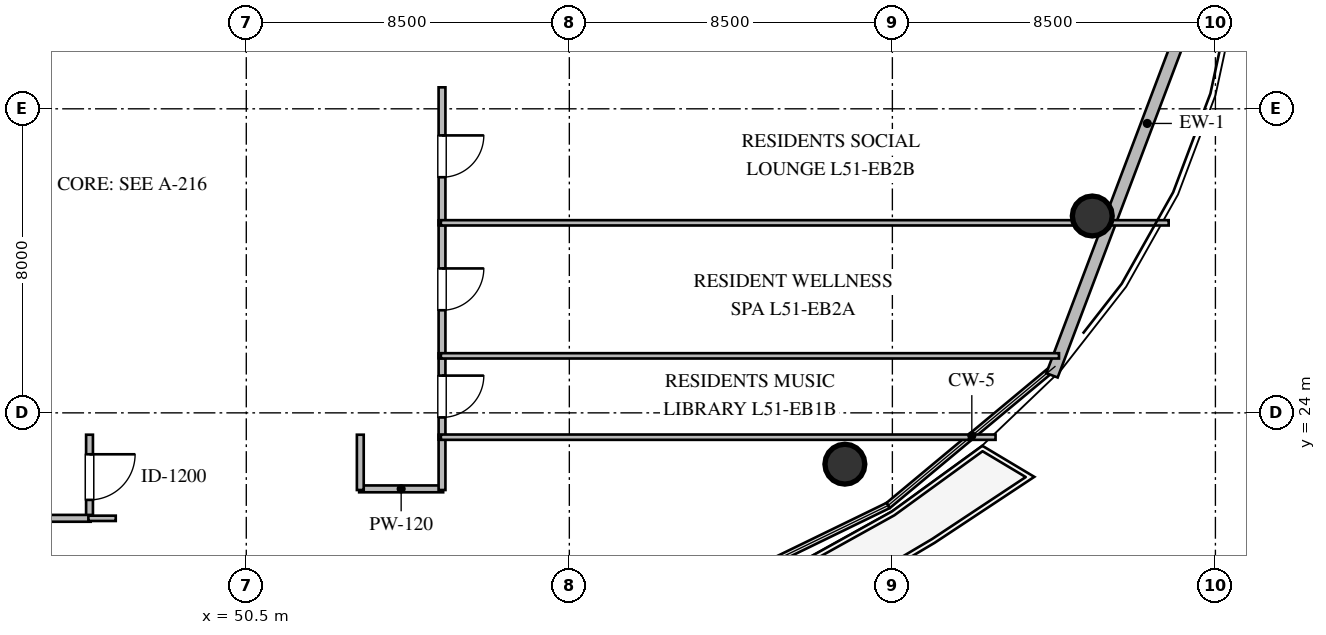
"""IFC4 building model, lengths in metres.
Left out: names, types, materials, properties, quantities, classifications, styles, units other than length and angle.
Written with IfcOpenShell. Run it as: python <this file> out.ifc"""

import sys

from ifc_helpers import new_model, si_unit, direction, frame, frame_2d, origin, origin_2d, place, context, subcontext, project, spatial, rectangle, circle, extrude, element, fill, save


model = new_model("IFC4")
c1 = context("Model", 3, precision=1e-05, world=origin(), true_north=direction((0.0, 1.0)))
c2 = subcontext(c1, "Body", "Model", "MODEL_VIEW")
j1 = project(units=[si_unit("LENGTHUNIT", "METRE"), si_unit("PLANEANGLEUNIT", "RADIAN")], contexts=[c1])
p1 = place(None, origin())
s1 = spatial("IfcSite", under=j1, at=p1, CompositionType="ELEMENT")
p2 = place(p1, origin())
s2 = spatial("IfcBuilding", under=s1, at=p2, CompositionType="ELEMENT")
p3 = place(p2, frame((0.0, 0.0, 195.6)))
s3 = spatial("IfcBuildingStorey", under=s2, at=p3, CompositionType="ELEMENT", Elevation=195.6)
for number, where, z_axis, x_axis in (
    (1, (66.25, 22.65, 0.0), (0.0, 0.0, 1.0), (1.0, 0.0, 0.0)),
    (2, (72.76, 29.18, 0.0), (0.0, 0.0, 1.0), (1.0, 0.0, 0.0)),
):
    element("IfcColumn", number, at=place(p3, frame(where, z_axis=z_axis, x_axis=x_axis)), inside=s3, PredefinedType="COLUMN", context=c2, shape_type="SweptSolid", body=[
        extrude(circle(Radius=0.525, at=origin_2d()), origin(), (0.0, 0.0, 1.0), 3.6),
    ])
p4 = place(p3, frame((76.712, 38.243, 0.0), z_axis=(0.0, 0.0, 1.0), x_axis=(-0.353659523244, -0.935374225441, 0.0)))
e3 = element("IfcWall", 3, at=p4, inside=s3, PredefinedType="STANDARD", context=c2, shape_type="SweptSolid", body=[
    extrude(rectangle(XDim=14.172, YDim=0.32, at=frame_2d((7.086, 0.0))), origin(), (0.0, 0.0, 1.0), 3.36),
])
p5 = place(p3, frame((46.375, 23.425, 0.0), z_axis=(0.0, 0.0, 1.0), x_axis=(0.0, -1.0, 0.0)))
e4 = element("IfcWall", 4, at=p5, inside=s3, PredefinedType="PARTITIONING", context=c2, shape_type="SweptSolid", body=[
    extrude(rectangle(XDim=2.23, YDim=0.18, at=frame_2d((1.115, 0.0))), origin(), (0.0, 0.0, 1.0), 3.36),
])
p6 = place(p5, frame((0.515, 0.0, 0.0)))
e5 = element("IfcOpeningElement", 5, at=p6, cuts=e4, PredefinedType="OPENING", context=c2, shape_type="SweptSolid", body=[
    extrude(rectangle(XDim=1.2, YDim=2.15, at=frame_2d((0.6, 1.075))), frame((0.0, 0.1, 0.0), z_axis=(0.0, -1.0, 0.0), x_axis=(1.0, 0.0, 0.0)), (0.0, 0.0, 1.0), 0.2),
])
p7 = place(p3, frame((55.68, 22.0, 0.0), z_axis=(0.0, 0.0, 1.0), x_axis=(-1.0, 0.0, 0.0)))
e6 = element("IfcWall", 6, at=p7, inside=s3, PredefinedType="PARTITIONING", context=c2, shape_type="SweptSolid", body=[
    extrude(rectangle(XDim=2.21, YDim=0.18, at=frame_2d((1.105, 0.0))), origin(), (0.0, 0.0, 1.0), 3.36),
])
for number, where, z_axis, x_axis in (
    (7, (55.65, 23.425, 0.0), (0.0, 0.0, 1.0), (0.0, -1.0, 0.0)),
    (8, (53.5, 21.97, 0.0), (0.0, 0.0, 1.0), (0.0, 1.0, 0.0)),
):
    element("IfcWall", number, at=place(p3, frame(where, z_axis=z_axis, x_axis=x_axis)), inside=s3, PredefinedType="PARTITIONING", context=c2, shape_type="SweptSolid", body=[
        extrude(rectangle(XDim=1.455, YDim=0.18, at=frame_2d((0.728, 0.0))), origin(), (0.0, 0.0, 1.0), 3.36),
    ])
p8 = place(p3, frame((55.65, 25.565, 0.0), z_axis=(0.0, 0.0, 1.0), x_axis=(0.0, -1.0, 0.0)))
e9 = element("IfcWall", 9, at=p8, inside=s3, PredefinedType="PARTITIONING", context=c2, shape_type="SweptSolid", body=[
    extrude(rectangle(XDim=2.27, YDim=0.18, at=frame_2d((1.135, 0.0))), origin(), (0.0, 0.0, 1.0), 3.36),
])
p9 = place(p8, frame((0.585, 0.0, 0.0)))
e10 = element("IfcOpeningElement", 10, at=p9, cuts=e9, PredefinedType="OPENING", context=c2, shape_type="SweptSolid", body=[
    extrude(rectangle(XDim=1.1, YDim=2.1, at=frame_2d((0.55, 1.05))), frame((0.0, 0.1, 0.0), z_axis=(0.0, -1.0, 0.0), x_axis=(1.0, 0.0, 0.0)), (0.0, 0.0, 1.0), 0.2),
])
p10 = place(p3, frame((55.65, 29.065, 0.0), z_axis=(0.0, 0.0, 1.0), x_axis=(0.0, -1.0, 0.0)))
e11 = element("IfcWall", 11, at=p10, inside=s3, PredefinedType="PARTITIONING", context=c2, shape_type="SweptSolid", body=[
    extrude(rectangle(XDim=3.63, YDim=0.18, at=frame_2d((1.815, 0.0))), origin(), (0.0, 0.0, 1.0), 3.36),
])
p11 = place(p10, frame((1.265, 0.0, 0.0)))
e12 = element("IfcOpeningElement", 12, at=p11, cuts=e11, PredefinedType="OPENING", context=c2, shape_type="SweptSolid", body=[
    extrude(rectangle(XDim=1.1, YDim=2.1, at=frame_2d((0.55, 1.05))), frame((0.0, 0.1, 0.0), z_axis=(0.0, -1.0, 0.0), x_axis=(1.0, 0.0, 0.0)), (0.0, 0.0, 1.0), 0.2),
])
p12 = place(p3, frame((55.65, 32.565, 0.0), z_axis=(0.0, 0.0, 1.0), x_axis=(0.0, -1.0, 0.0)))
e13 = element("IfcWall", 13, at=p12, inside=s3, PredefinedType="PARTITIONING", context=c2, shape_type="SweptSolid", body=[
    extrude(rectangle(XDim=3.63, YDim=0.18, at=frame_2d((1.815, 0.0))), origin(), (0.0, 0.0, 1.0), 3.36),
])
p13 = place(p12, frame((1.265, 0.0, 0.0)))
e14 = element("IfcOpeningElement", 14, at=p13, cuts=e13, PredefinedType="OPENING", context=c2, shape_type="SweptSolid", body=[
    extrude(rectangle(XDim=1.1, YDim=2.1, at=frame_2d((0.55, 1.05))), frame((0.0, 0.1, 0.0), z_axis=(0.0, -1.0, 0.0), x_axis=(1.0, 0.0, 0.0)), (0.0, 0.0, 1.0), 0.2),
])
p14 = place(p3, frame((46.405, 21.225, 0.0), z_axis=(0.0, 0.0, 1.0), x_axis=(-1.0, 0.0, 0.0)))
e15 = element("IfcWall", 15, at=p14, inside=s3, PredefinedType="PARTITIONING", context=c2, shape_type="SweptSolid", body=[
    extrude(rectangle(XDim=13.47, YDim=0.18, at=frame_2d((6.735, 0.0))), origin(), (0.0, 0.0, 1.0), 2.996),
])
p15 = place(p14, frame((6.185, 0.0, 0.0)))
e16 = element("IfcOpeningElement", 16, at=p15, cuts=e15, PredefinedType="OPENING", context=c2, shape_type="SweptSolid", body=[
    extrude(rectangle(XDim=1.1, YDim=2.1, at=frame_2d((0.55, 1.05))), frame((0.0, 0.1, 0.0), z_axis=(0.0, -1.0, 0.0), x_axis=(1.0, 0.0, 0.0)), (0.0, 0.0, 1.0), 0.2),
])
p16 = place(p3, frame((55.62, 23.36, 0.0), z_axis=(0.0, 0.0, 1.0), x_axis=(1.0, 0.0, 0.0)))
e17 = element("IfcWall", 17, at=p16, inside=s3, PredefinedType="PARTITIONING", context=c2, shape_type="SweptSolid", body=[
    extrude(rectangle(XDim=14.595, YDim=0.14, at=frame_2d((7.297, 0.0))), origin(), (0.0, 0.0, 1.0), 2.89),
])
p17 = place(p3, frame((47.065, 21.225, 0.0), z_axis=(0.0, 0.0, 1.0), x_axis=(-1.0, 0.0, 0.0)))
e18 = element("IfcWall", 18, at=p17, inside=s3, PredefinedType="PARTITIONING", context=c2, shape_type="SweptSolid", body=[
    extrude(rectangle(XDim=0.72, YDim=0.14, at=frame_2d((0.36, 0.0))), origin(), (0.0, 0.0, 1.0), 2.996),
])
p18 = place(p3, frame((55.62, 25.5, 0.0), z_axis=(0.0, 0.0, 1.0), x_axis=(1.0, 0.0, 0.0)))
e19 = element("IfcWall", 19, at=p18, inside=s3, PredefinedType="PARTITIONING", context=c2, shape_type="SweptSolid", body=[
    extrude(rectangle(XDim=16.264, YDim=0.14, at=frame_2d((8.132, 0.0))), origin(), (0.0, 0.0, 1.0), 2.89),
])
p19 = place(p3, frame((55.62, 29.0, 0.0), z_axis=(0.0, 0.0, 1.0), x_axis=(1.0, 0.0, 0.0)))
e20 = element("IfcWall", 20, at=p19, inside=s3, PredefinedType="PARTITIONING", context=c2, shape_type="SweptSolid", body=[
    extrude(rectangle(XDim=19.15, YDim=0.14, at=frame_2d((9.575, 0.0))), origin(), (0.0, 0.0, 1.0), 2.89),
])
p20 = place(p6, origin())
e21 = element("IfcDoor", 21, at=p20, inside=s3, OperationType="SINGLE_SWING_LEFT", PredefinedType="DOOR", context=c2, shape_type="SweptSolid", body=[
    extrude(rectangle(XDim=1.2, YDim=2.15, at=frame_2d((0.6, 1.075))), frame((0.0, 0.025, 0.0), z_axis=(0.0, -1.0, 0.0), x_axis=(1.0, 0.0, 0.0)), (0.0, 0.0, 1.0), 0.05),
])
fill(e5, e21)
p21 = place(p9, origin())
e22 = element("IfcDoor", 22, at=p21, inside=s3, OperationType="SINGLE_SWING_LEFT", PredefinedType="DOOR", context=c2, shape_type="SweptSolid", body=[
    extrude(rectangle(XDim=1.1, YDim=2.1, at=frame_2d((0.55, 1.05))), frame((0.0, 0.025, 0.0), z_axis=(0.0, -1.0, 0.0), x_axis=(1.0, 0.0, 0.0)), (0.0, 0.0, 1.0), 0.05),
])
fill(e10, e22)
p22 = place(p11, origin())
e23 = element("IfcDoor", 23, at=p22, inside=s3, OperationType="SINGLE_SWING_LEFT", PredefinedType="DOOR", context=c2, shape_type="SweptSolid", body=[
    extrude(rectangle(XDim=1.1, YDim=2.1, at=frame_2d((0.55, 1.05))), frame((0.0, 0.025, 0.0), z_axis=(0.0, -1.0, 0.0), x_axis=(1.0, 0.0, 0.0)), (0.0, 0.0, 1.0), 0.05),
])
fill(e12, e23)
p23 = place(p13, origin())
e24 = element("IfcDoor", 24, at=p23, inside=s3, OperationType="SINGLE_SWING_LEFT", PredefinedType="DOOR", context=c2, shape_type="SweptSolid", body=[
    extrude(rectangle(XDim=1.1, YDim=2.1, at=frame_2d((0.55, 1.05))), frame((0.0, 0.025, 0.0), z_axis=(0.0, -1.0, 0.0), x_axis=(1.0, 0.0, 0.0)), (0.0, 0.0, 1.0), 0.05),
])
fill(e14, e24)
save(model, sys.argv[1])
